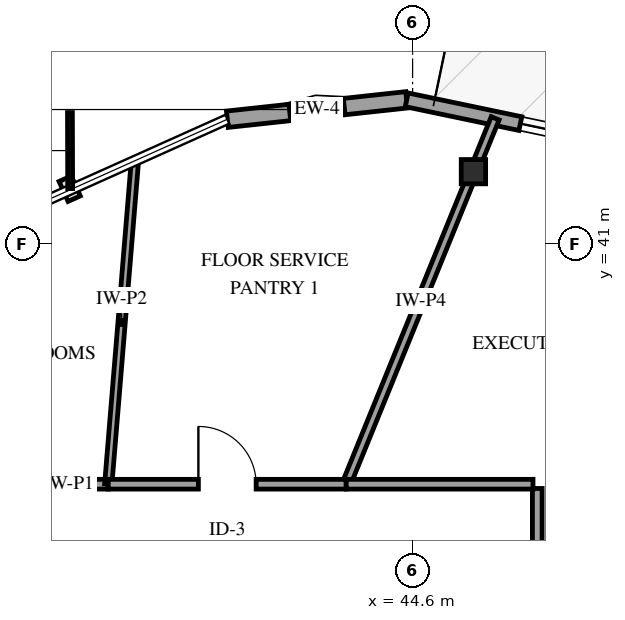
"""IFC4 building model, lengths in metres.
Left out: names, types, materials, properties, quantities, classifications, styles, units other than length and angle.
Written with IfcOpenShell. Run it as: python <this file> out.ifc"""

import sys

from ifc_helpers import new_model, si_unit, direction, frame, frame_2d, origin, origin_2d, place, context, subcontext, project, spatial, rectangle, i_section, extrude, element, fill, save


model = new_model("IFC4")
c1 = context("Model", 3, precision=1e-05, world=origin(), true_north=direction((0.0, 1.0)))
c2 = subcontext(c1, "Body", "Model", "MODEL_VIEW")
j1 = project(units=[si_unit("LENGTHUNIT", "METRE"), si_unit("PLANEANGLEUNIT", "RADIAN")], contexts=[c1])
p1 = place(None, origin())
s1 = spatial("IfcSite", under=j1, at=p1, CompositionType="ELEMENT")
p2 = place(p1, origin())
s2 = spatial("IfcBuilding", under=s1, at=p2, CompositionType="ELEMENT")
p3 = place(p2, frame((0.0, 0.0, 253.75)))
s3 = spatial("IfcBuildingStorey", under=s2, at=p3, CompositionType="ELEMENT", Elevation=253.75)
p4 = place(p3, frame((45.6, 42.189, 0.0), z_axis=(0.0, 0.0, 1.0), x_axis=(1.0, 0.0, 0.0)))
e1 = element("IfcColumn", 1, at=p4, inside=s3, PredefinedType="COLUMN", context=c2, shape_type="SweptSolid", body=[
    extrude(i_section(OverallWidth=0.401, OverallDepth=0.399, WebThickness=0.025, FlangeThickness=0.04, FilletRadius=0.038, at=origin_2d()), origin(), (0.0, 0.0, 1.0), 3.75),
])
p5 = place(p3, frame((44.503, 43.371, 0.0), z_axis=(0.0, 0.0, 1.0), x_axis=(-0.994188969029, -0.107648938037, 0.0)))
e2 = element("IfcWall", 2, at=p5, inside=s3, PredefinedType="SOLIDWALL", context=c2, shape_type="SweptSolid", body=[
    extrude(rectangle(XDim=2.967, YDim=0.27, at=frame_2d((1.483, 0.0))), origin(), (0.0, 0.0, 1.0), 2.829),
])
p6 = place(p5, frame((1.033, 0.0, 0.75)))
e3 = element("IfcOpeningElement", 3, at=p6, cuts=e2, PredefinedType="OPENING", context=c2, shape_type="SweptSolid", body=[
    extrude(rectangle(XDim=0.9, YDim=1.5, at=frame_2d((0.45, 0.75))), frame((0.0, 0.145, 0.0), z_axis=(0.0, -1.0, 0.0), x_axis=(1.0, 0.0, 0.0)), (0.0, 0.0, 1.0), 0.29),
])
p7 = place(p3, frame((52.822, 41.63, 0.0), z_axis=(0.0, 0.0, 1.0), x_axis=(-0.978792902195, 0.204852275096, 0.0)))
e4 = element("IfcWall", 4, at=p7, inside=s3, PredefinedType="SOLIDWALL", context=c2, shape_type="SweptSolid", body=[
    extrude(rectangle(XDim=8.5, YDim=0.23, at=frame_2d((4.25, 0.0))), origin(), (0.0, 0.0, 1.0), 2.829),
])
p8 = place(p7, frame((3.75, 0.0, 0.0)))
e5 = element("IfcOpeningElement", 5, at=p8, cuts=e4, PredefinedType="OPENING", context=c2, shape_type="SweptSolid", body=[
    extrude(rectangle(XDim=1.0, YDim=2.15, at=frame_2d((0.5, 1.075))), frame((0.0, 0.125, 0.0), z_axis=(0.0, -1.0, 0.0), x_axis=(1.0, 0.0, 0.0)), (0.0, 0.0, 1.0), 0.25),
])
p9 = place(p7, frame((0.44, 0.0, 0.72)))
e6 = element("IfcOpeningElement", 6, at=p9, cuts=e4, PredefinedType="OPENING", context=c2, shape_type="SweptSolid", body=[
    extrude(rectangle(XDim=1.2, YDim=1.6, at=frame_2d((0.6, 0.8))), frame((0.0, 0.125, 0.0), z_axis=(0.0, -1.0, 0.0), x_axis=(1.0, 0.0, 0.0)), (0.0, 0.0, 1.0), 0.25),
])
p10 = place(p7, frame((5.39, 0.0, 0.72)))
e7 = element("IfcOpeningElement", 7, at=p10, cuts=e4, PredefinedType="OPENING", context=c2, shape_type="SweptSolid", body=[
    extrude(rectangle(XDim=1.2, YDim=1.6, at=frame_2d((0.6, 0.8))), frame((0.0, 0.125, 0.0), z_axis=(0.0, -1.0, 0.0), x_axis=(1.0, 0.0, 0.0)), (0.0, 0.0, 1.0), 0.25),
])
p11 = place(p3, frame((31.298, 37.05, 0.0), z_axis=(0.0, 0.0, 1.0), x_axis=(1.0, 0.0, 0.0)))
e8 = element("IfcWall", 8, at=p11, inside=s3, PredefinedType="PARTITIONING", context=c2, shape_type="SweptSolid", body=[
    extrude(rectangle(XDim=8.297, YDim=0.16, at=frame_2d((4.148, 0.0))), origin(), (0.0, 0.0, 1.0), 3.45),
])
p12 = place(p11, frame((3.674, 0.0, 0.0)))
e9 = element("IfcOpeningElement", 9, at=p12, cuts=e8, PredefinedType="OPENING", context=c2, shape_type="SweptSolid", body=[
    extrude(rectangle(XDim=0.95, YDim=2.15, at=frame_2d((0.475, 1.075))), frame((0.0, 0.09, 0.0), z_axis=(0.0, -1.0, 0.0), x_axis=(1.0, 0.0, 0.0)), (0.0, 0.0, 1.0), 0.18),
])
p13 = place(p3, frame((43.508, 37.05, 0.0), z_axis=(0.0, 0.0, 1.0), x_axis=(0.377117821417, 0.926165292359, 0.0)))
e10 = element("IfcWall", 10, at=p13, inside=s3, PredefinedType="PARTITIONING", context=c2, shape_type="SweptSolid", body=[
    extrude(rectangle(XDim=6.497, YDim=0.14, at=frame_2d((3.248, 0.0))), origin(), (0.0, 0.0, 1.0), 2.745),
])
p14 = place(p3, frame((39.595, 37.05, 0.0), z_axis=(0.0, 0.0, 1.0), x_axis=(0.082231683065, 0.996613240079, 0.0)))
e11 = element("IfcWall", 11, at=p14, inside=s3, PredefinedType="PARTITIONING", context=c2, shape_type="SweptSolid", body=[
    extrude(rectangle(XDim=5.338, YDim=0.12, at=frame_2d((2.669, 0.0))), origin(), (0.0, 0.0, 1.0), 3.45),
])
p15 = place(p3, frame((39.595, 37.05, 0.0), z_axis=(0.0, 0.0, 1.0), x_axis=(1.0, 0.0, 0.0)))
e12 = element("IfcWall", 12, at=p15, inside=s3, PredefinedType="PARTITIONING", context=c2, shape_type="SweptSolid", body=[
    extrude(rectangle(XDim=3.913, YDim=0.16, at=frame_2d((1.957, 0.0))), origin(), (0.0, 0.0, 1.0), 3.45),
])
p16 = place(p15, frame((1.482, 0.0, 0.0)))
e13 = element("IfcOpeningElement", 13, at=p16, cuts=e12, PredefinedType="OPENING", context=c2, shape_type="SweptSolid", body=[
    extrude(rectangle(XDim=0.95, YDim=2.15, at=frame_2d((0.475, 1.075))), frame((0.0, 0.09, 0.0), z_axis=(0.0, -1.0, 0.0), x_axis=(1.0, 0.0, 0.0)), (0.0, 0.0, 1.0), 0.18),
])
p17 = place(p3, frame((46.65, 36.98, 0.0), z_axis=(0.0, 0.0, 1.0), x_axis=(0.0, -1.0, 0.0)))
e14 = element("IfcWall", 14, at=p17, inside=s3, PredefinedType="PARTITIONING", context=c2, shape_type="SweptSolid", body=[
    extrude(rectangle(XDim=3.41, YDim=0.16, at=frame_2d((1.705, 0.0))), origin(), (0.0, 0.0, 1.0), 3.45),
])
p18 = place(p17, frame((1.23, 0.0, 0.0)))
e15 = element("IfcOpeningElement", 15, at=p18, cuts=e14, PredefinedType="OPENING", context=c2, shape_type="SweptSolid", body=[
    extrude(rectangle(XDim=0.95, YDim=2.15, at=frame_2d((0.475, 1.075))), frame((0.0, 0.09, 0.0), z_axis=(0.0, -1.0, 0.0), x_axis=(1.0, 0.0, 0.0)), (0.0, 0.0, 1.0), 0.18),
])
p19 = place(p3, frame((43.508, 37.05, 0.0), z_axis=(0.0, 0.0, 1.0), x_axis=(1.0, 0.0, 0.0)))
e16 = element("IfcWall", 16, at=p19, inside=s3, PredefinedType="PARTITIONING", context=c2, shape_type="SweptSolid", body=[
    extrude(rectangle(XDim=3.072, YDim=0.16, at=frame_2d((1.536, 0.0))), origin(), (0.0, 0.0, 1.0), 3.45),
])
p20 = place(p6, origin())
e17 = element("IfcWindow", 17, at=p20, inside=s3, PartitioningType="SINGLE_PANEL", PredefinedType="WINDOW", context=c2, shape_type="SweptSolid", body=[
    extrude(rectangle(XDim=0.9, YDim=1.5, at=frame_2d((0.45, 0.75))), frame((0.0, 0.03, 0.0), z_axis=(0.0, -1.0, 0.0), x_axis=(1.0, 0.0, 0.0)), (0.0, 0.0, 1.0), 0.06),
])
fill(e3, e17)
p21 = place(p10, origin())
e18 = element("IfcWindow", 18, at=p21, inside=s3, PartitioningType="SINGLE_PANEL", PredefinedType="WINDOW", context=c2, shape_type="SweptSolid", body=[
    extrude(rectangle(XDim=1.2, YDim=1.6, at=frame_2d((0.6, 0.8))), frame((0.0, 0.03, 0.0), z_axis=(0.0, -1.0, 0.0), x_axis=(1.0, 0.0, 0.0)), (0.0, 0.0, 1.0), 0.06),
])
fill(e7, e18)
p22 = place(p16, origin())
e19 = element("IfcDoor", 19, at=p22, inside=s3, OperationType="SINGLE_SWING_LEFT", PredefinedType="DOOR", context=c2, shape_type="SweptSolid", body=[
    extrude(rectangle(XDim=0.95, YDim=2.15, at=frame_2d((0.475, 1.075))), frame((0.0, 0.025, 0.0), z_axis=(0.0, -1.0, 0.0), x_axis=(1.0, 0.0, 0.0)), (0.0, 0.0, 1.0), 0.05),
])
fill(e13, e19)
save(model, sys.argv[1])
